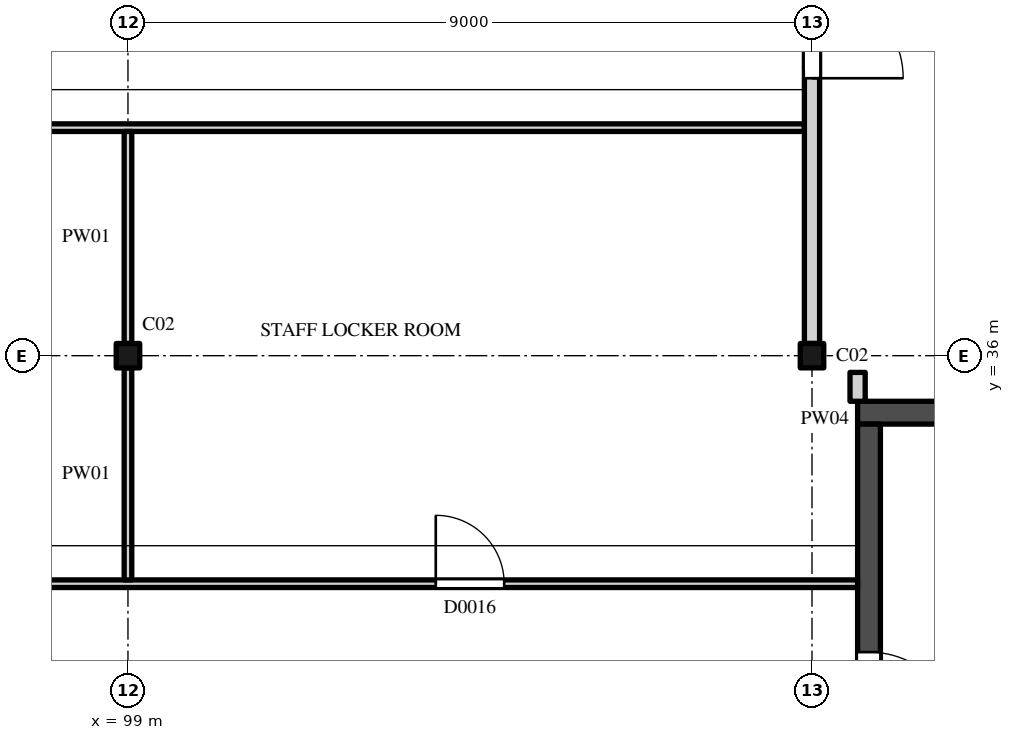
"""IFC4 building model, lengths in metres.
Left out: names, types, materials, properties, quantities, classifications, styles, units other than length and angle.
Written with IfcOpenShell. Run it as: python <this file> out.ifc"""

import sys

from ifc_helpers import new_model, si_unit, direction, frame, frame_2d, origin, origin_2d, place, context, subcontext, project, spatial, rectangle, i_section, extrude, element, fill, save


model = new_model("IFC4")
c1 = context("Model", 3, precision=1e-05, world=origin(), true_north=direction((0.0, 1.0)))
c2 = subcontext(c1, "Body", "Model", "MODEL_VIEW")
j1 = project(units=[si_unit("LENGTHUNIT", "METRE"), si_unit("PLANEANGLEUNIT", "RADIAN")], contexts=[c1])
p1 = place(None, origin())
s1 = spatial("IfcSite", under=j1, at=p1, CompositionType="ELEMENT")
p2 = place(p1, origin())
s2 = spatial("IfcBuilding", under=s1, at=p2, CompositionType="ELEMENT")
p3 = place(p2, origin())
s3 = spatial("IfcBuildingStorey", under=s2, at=p3, CompositionType="ELEMENT", Elevation=0.0)
for number, where, z_axis, x_axis in (
    (1, (99.0, 36.0, 0.0), (0.0, 0.0, 1.0), (1.0, 0.0, 0.0)),
    (2, (108.0, 36.0, 0.0), (0.0, 0.0, 1.0), (1.0, 0.0, 0.0)),
):
    element("IfcColumn", number, at=place(p3, frame(where, z_axis=z_axis, x_axis=x_axis)), inside=s3, PredefinedType="COLUMN", context=c2, shape_type="SweptSolid", body=[
        extrude(i_section(OverallWidth=0.309, OverallDepth=0.321, WebThickness=0.014, FlangeThickness=0.022, FilletRadius=0.017, at=origin_2d()), origin(), (0.0, 0.0, 1.0), 6.0),
    ])
p4 = place(p3, frame((108.6, 35.25, 0.0), z_axis=(0.0, 0.0, 1.0), x_axis=(1.0, 0.0, 0.0)))
e3 = element("IfcWall", 3, at=p4, inside=s3, PredefinedType="SHEAR", context=c2, shape_type="SweptSolid", body=[
    extrude(rectangle(XDim=8.1, YDim=0.3, at=frame_2d((4.05, 0.0))), origin(), (0.0, 0.0, 1.0), 6.0),
])
p5 = place(p3, frame((108.75, 27.9, 0.0), z_axis=(0.0, 0.0, 1.0), x_axis=(0.0, 1.0, 0.0)))
e4 = element("IfcWall", 4, at=p5, inside=s3, PredefinedType="SHEAR", context=c2, shape_type="SweptSolid", body=[
    extrude(rectangle(XDim=7.2, YDim=0.3, at=frame_2d((3.6, 0.0))), origin(), (0.0, 0.0, 1.0), 6.0),
])
p6 = place(p5, frame((3.0, 0.0, 0.0)))
e5 = element("IfcOpeningElement", 5, at=p6, cuts=e4, PredefinedType="OPENING", context=c2, shape_type="SweptSolid", body=[
    extrude(rectangle(XDim=1.2, YDim=2.1, at=frame_2d((0.6, 1.05))), frame((0.0, 0.16, 0.0), z_axis=(0.0, -1.0, 0.0), x_axis=(1.0, 0.0, 0.0)), (0.0, 0.0, 1.0), 0.32),
])
p7 = place(p3, frame((74.95, 33.0, 0.0), z_axis=(0.0, 0.0, 1.0), x_axis=(1.0, 0.0, 0.0)))
e6 = element("IfcWall", 6, at=p7, inside=s3, PredefinedType="PARTITIONING", context=c2, shape_type="SweptSolid", body=[
    extrude(rectangle(XDim=33.65, YDim=0.1, at=frame_2d((16.825, 0.0))), origin(), (0.0, 0.0, 1.0), 5.422),
])
p8 = place(p7, frame((14.5, 0.0, 0.0)))
e7 = element("IfcOpeningElement", 7, at=p8, cuts=e6, PredefinedType="OPENING", context=c2, shape_type="SweptSolid", body=[
    extrude(rectangle(XDim=1.1, YDim=2.1, at=frame_2d((0.55, 1.05))), frame((0.0, 0.06, 0.0), z_axis=(0.0, -1.0, 0.0), x_axis=(1.0, 0.0, 0.0)), (0.0, 0.0, 1.0), 0.12),
])
p9 = place(p7, frame((28.1, 0.0, 0.0)))
e8 = element("IfcOpeningElement", 8, at=p9, cuts=e6, PredefinedType="OPENING", context=c2, shape_type="SweptSolid", body=[
    extrude(rectangle(XDim=0.9, YDim=2.1, at=frame_2d((0.45, 1.05))), frame((0.0, 0.06, 0.0), z_axis=(0.0, -1.0, 0.0), x_axis=(1.0, 0.0, 0.0)), (0.0, 0.0, 1.0), 0.12),
])
p10 = place(p3, frame((74.95, 39.0, 0.0), z_axis=(0.0, 0.0, 1.0), x_axis=(1.0, 0.0, 0.0)))
e9 = element("IfcWall", 9, at=p10, inside=s3, PredefinedType="PARTITIONING", context=c2, shape_type="SweptSolid", body=[
    extrude(rectangle(XDim=32.95, YDim=0.1, at=frame_2d((16.475, 0.0))), origin(), (0.0, 0.0, 1.0), 5.422),
])
for number, where, z_axis, x_axis in (
    (10, (99.0, 33.05, 0.0), (0.0, 0.0, 1.0), (0.0, 1.0, 0.0)),
    (11, (99.0, 36.16, 0.0), (0.0, 0.0, 1.0), (0.0, 1.0, 0.0)),
):
    element("IfcWall", number, at=place(p3, frame(where, z_axis=z_axis, x_axis=x_axis)), inside=s3, PredefinedType="PARTITIONING", context=c2, shape_type="SweptSolid", body=[
        extrude(rectangle(XDim=2.79, YDim=0.1, at=frame_2d((1.395, 0.0))), origin(), (0.0, 0.0, 1.0), 5.292),
    ])
p11 = place(p3, frame((108.0, 36.16, 0.0), z_axis=(0.0, 0.0, 1.0), x_axis=(0.0, 1.0, 0.0)))
e12 = element("IfcWall", 12, at=p11, inside=s3, PredefinedType="PARTITIONING", context=c2, shape_type="SweptSolid", body=[
    extrude(rectangle(XDim=8.679, YDim=0.2, at=frame_2d((4.34, 0.0))), origin(), (0.0, 0.0, 1.0), 5.292),
])
p12 = place(p11, frame((3.49, 0.0, 0.0)))
e13 = element("IfcOpeningElement", 13, at=p12, cuts=e12, PredefinedType="OPENING", context=c2, shape_type="SweptSolid", body=[
    extrude(rectangle(XDim=1.2, YDim=2.1, at=frame_2d((0.6, 1.05))), frame((0.0, 0.11, 0.0), z_axis=(0.0, -1.0, 0.0), x_axis=(1.0, 0.0, 0.0)), (0.0, 0.0, 1.0), 0.22),
])
p13 = place(p3, frame((108.6, 35.4, 0.0), z_axis=(0.0, 0.0, 1.0), x_axis=(0.0, 1.0, 0.0)))
e14 = element("IfcWall", 14, at=p13, inside=s3, PredefinedType="PARTITIONING", context=c2, shape_type="SweptSolid", body=[
    extrude(rectangle(XDim=0.38, YDim=0.2, at=frame_2d((0.19, 0.0))), origin(), (0.0, 0.0, 1.0), 5.825),
])
p14 = place(p6, origin())
e15 = element("IfcDoor", 15, at=p14, inside=s3, OperationType="SINGLE_SWING_LEFT", PredefinedType="DOOR", context=c2, shape_type="SweptSolid", body=[
    extrude(rectangle(XDim=1.2, YDim=2.1, at=frame_2d((0.6, 1.05))), frame((0.0, 0.025, 0.0), z_axis=(0.0, -1.0, 0.0), x_axis=(1.0, 0.0, 0.0)), (0.0, 0.0, 1.0), 0.05),
])
fill(e5, e15)
p15 = place(p9, origin())
e16 = element("IfcDoor", 16, at=p15, inside=s3, OperationType="SINGLE_SWING_RIGHT", PredefinedType="DOOR", context=c2, shape_type="SweptSolid", body=[
    extrude(rectangle(XDim=0.9, YDim=2.1, at=frame_2d((0.45, 1.05))), frame((0.0, 0.025, 0.0), z_axis=(0.0, -1.0, 0.0), x_axis=(1.0, 0.0, 0.0)), (0.0, 0.0, 1.0), 0.05),
])
fill(e8, e16)
p16 = place(p12, origin())
e17 = element("IfcDoor", 17, at=p16, inside=s3, OperationType="SINGLE_SWING_LEFT", PredefinedType="DOOR", context=c2, shape_type="SweptSolid", body=[
    extrude(rectangle(XDim=1.2, YDim=2.1, at=frame_2d((0.6, 1.05))), frame((0.0, 0.025, 0.0), z_axis=(0.0, -1.0, 0.0), x_axis=(1.0, 0.0, 0.0)), (0.0, 0.0, 1.0), 0.05),
])
fill(e13, e17)
save(model, sys.argv[1])
